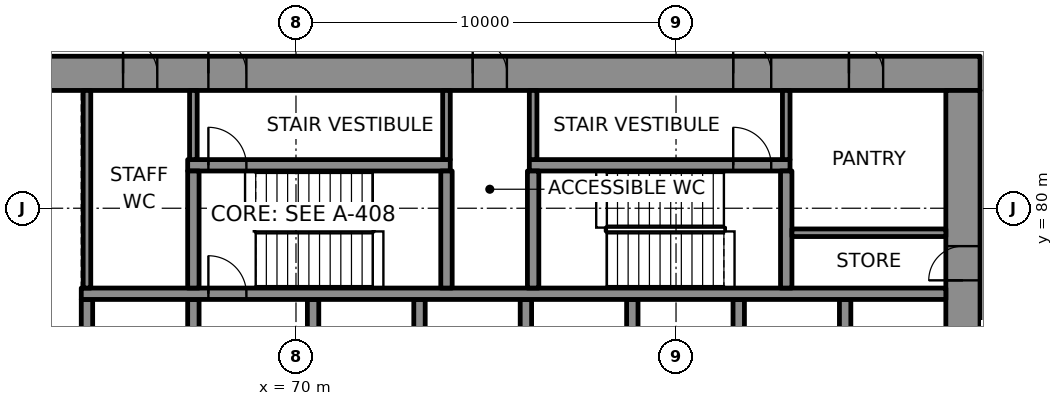
"""IFC4 building model, lengths in metres.
Left out: names, types, materials, properties, quantities, classifications, styles, units other than length and angle.
Written with IfcOpenShell. Run it as: python <this file> out.ifc"""

import sys

from ifc_helpers import new_model, si_unit, direction, frame, frame_2d, origin, place, context, subcontext, project, spatial, rectangle, extrude, element, fill, save


model = new_model("IFC4")
c1 = context("Model", 3, precision=1e-05, world=origin(), true_north=direction((0.0, 1.0)))
c2 = subcontext(c1, "Body", "Model", "MODEL_VIEW")
j1 = project(units=[si_unit("LENGTHUNIT", "METRE"), si_unit("PLANEANGLEUNIT", "RADIAN")], contexts=[c1])
p1 = place(None, origin())
s1 = spatial("IfcSite", under=j1, at=p1, CompositionType="ELEMENT")
p2 = place(p1, origin())
s2 = spatial("IfcBuilding", under=s1, at=p2, CompositionType="ELEMENT")
p3 = place(p2, frame((0.0, 0.0, 111.4)))
s3 = spatial("IfcBuildingStorey", under=s2, at=p3, CompositionType="ELEMENT", Elevation=111.4)
p4 = place(p3, frame((62.9, 83.55, 0.0), z_axis=(0.0, 0.0, 1.0), x_axis=(1.0, 0.0, 0.0)))
e1 = element("IfcWall", 1, at=p4, inside=s3, PredefinedType="SHEAR", context=c2, shape_type="SweptSolid", body=[
    extrude(rectangle(XDim=25.1, YDim=0.9, at=frame_2d((12.55, 0.0))), origin(), (0.0, 0.0, 1.0), 4.0),
])
p5 = place(p4, frame((4.795, 0.0, 0.0)))
e2 = element("IfcOpeningElement", 2, at=p5, cuts=e1, PredefinedType="OPENING", context=c2, shape_type="SweptSolid", body=[
    extrude(rectangle(XDim=1.0, YDim=2.1, at=frame_2d((0.5, 1.05))), frame((0.0, 0.46, 0.0), z_axis=(0.0, -1.0, 0.0), x_axis=(1.0, 0.0, 0.0)), (0.0, 0.0, 1.0), 0.92),
])
p6 = place(p4, frame((18.605, 0.0, 0.0)))
e3 = element("IfcOpeningElement", 3, at=p6, cuts=e1, PredefinedType="OPENING", context=c2, shape_type="SweptSolid", body=[
    extrude(rectangle(XDim=1.0, YDim=2.1, at=frame_2d((0.5, 1.05))), frame((0.0, 0.46, 0.0), z_axis=(0.0, -1.0, 0.0), x_axis=(1.0, 0.0, 0.0)), (0.0, 0.0, 1.0), 0.92),
])
p7 = place(p4, frame((2.55, 0.0, 0.0)))
e4 = element("IfcOpeningElement", 4, at=p7, cuts=e1, PredefinedType="OPENING", context=c2, shape_type="SweptSolid", body=[
    extrude(rectangle(XDim=0.9, YDim=2.1, at=frame_2d((0.45, 1.05))), frame((0.0, 0.46, 0.0), z_axis=(0.0, -1.0, 0.0), x_axis=(1.0, 0.0, 0.0)), (0.0, 0.0, 1.0), 0.92),
])
p8 = place(p4, frame((11.75, 0.0, 0.0)))
e5 = element("IfcOpeningElement", 5, at=p8, cuts=e1, PredefinedType="OPENING", context=c2, shape_type="SweptSolid", body=[
    extrude(rectangle(XDim=0.9, YDim=2.1, at=frame_2d((0.45, 1.05))), frame((0.0, 0.46, 0.0), z_axis=(0.0, -1.0, 0.0), x_axis=(1.0, 0.0, 0.0)), (0.0, 0.0, 1.0), 0.92),
])
p9 = place(p4, frame((21.65, 0.0, 0.0)))
e6 = element("IfcOpeningElement", 6, at=p9, cuts=e1, PredefinedType="OPENING", context=c2, shape_type="SweptSolid", body=[
    extrude(rectangle(XDim=0.9, YDim=2.1, at=frame_2d((0.45, 1.05))), frame((0.0, 0.46, 0.0), z_axis=(0.0, -1.0, 0.0), x_axis=(1.0, 0.0, 0.0)), (0.0, 0.0, 1.0), 0.92),
])
p10 = place(p3, frame((87.55, 66.9, 0.0), z_axis=(0.0, 0.0, 1.0), x_axis=(0.0, 1.0, 0.0)))
e7 = element("IfcWall", 7, at=p10, inside=s3, PredefinedType="SHEAR", context=c2, shape_type="SweptSolid", body=[
    extrude(rectangle(XDim=16.2, YDim=0.9, at=frame_2d((8.1, 0.0))), origin(), (0.0, 0.0, 1.0), 4.0),
])
p11 = place(p10, frame((5.5, 0.0, 0.0)))
e8 = element("IfcOpeningElement", 8, at=p11, cuts=e7, PredefinedType="OPENING", context=c2, shape_type="SweptSolid", body=[
    extrude(rectangle(XDim=1.8, YDim=2.1, at=frame_2d((0.9, 1.05))), frame((0.0, 0.46, 0.0), z_axis=(0.0, -1.0, 0.0), x_axis=(1.0, 0.0, 0.0)), (0.0, 0.0, 1.0), 0.92),
])
p12 = place(p10, frame((11.202, 0.0, 0.0)))
e9 = element("IfcOpeningElement", 9, at=p12, cuts=e7, PredefinedType="OPENING", context=c2, shape_type="SweptSolid", body=[
    extrude(rectangle(XDim=0.9, YDim=2.1, at=frame_2d((0.45, 1.05))), frame((0.0, 0.46, 0.0), z_axis=(0.0, -1.0, 0.0), x_axis=(1.0, 0.0, 0.0)), (0.0, 0.0, 1.0), 0.92),
])
for number, where, z_axis, x_axis in (
    (10, (64.5, 75.0, 0.0), (0.0, 0.0, 1.0), (0.0, 1.0, 0.0)),
    (11, (67.3, 75.0, 0.0), (0.0, 0.0, 1.0), (0.0, 1.0, 0.0)),
):
    element("IfcWall", number, at=place(p3, frame(where, z_axis=z_axis, x_axis=x_axis)), inside=s3, PredefinedType="SHEAR", context=c2, shape_type="SweptSolid", body=[
        extrude(rectangle(XDim=2.6, YDim=0.3, at=frame_2d((1.3, 0.0))), origin(), (0.0, 0.0, 1.0), 4.0),
    ])
p13 = place(p3, frame((70.45, 75.0, 0.0), z_axis=(0.0, 0.0, 1.0), x_axis=(0.0, 1.0, 0.0)))
e12 = element("IfcWall", 12, at=p13, inside=s3, PredefinedType="SHEAR", context=c2, shape_type="SweptSolid", body=[
    extrude(rectangle(XDim=2.6, YDim=0.3, at=frame_2d((1.3, 0.0))), origin(), (0.0, 0.0, 1.0), 4.0),
])
p14 = place(p13, frame((0.15, 0.0, 0.0)))
e13 = element("IfcOpeningElement", 13, at=p14, cuts=e12, PredefinedType="OPENING", context=c2, shape_type="SweptSolid", body=[
    extrude(rectangle(XDim=1.1, YDim=2.1, at=frame_2d((0.55, 1.05))), frame((0.0, 0.16, 0.0), z_axis=(0.0, -1.0, 0.0), x_axis=(1.0, 0.0, 0.0)), (0.0, 0.0, 1.0), 0.32),
])
for number, where, z_axis, x_axis in (
    (14, (73.25, 75.0, 0.0), (0.0, 0.0, 1.0), (0.0, 1.0, 0.0)),
    (15, (76.05, 75.0, 0.0), (0.0, 0.0, 1.0), (0.0, 1.0, 0.0)),
    (16, (78.85, 75.0, 0.0), (0.0, 0.0, 1.0), (0.0, 1.0, 0.0)),
    (17, (81.65, 75.0, 0.0), (0.0, 0.0, 1.0), (0.0, 1.0, 0.0)),
    (18, (84.45, 75.0, 0.0), (0.0, 0.0, 1.0), (0.0, 1.0, 0.0)),
):
    element("IfcWall", number, at=place(p3, frame(where, z_axis=z_axis, x_axis=x_axis)), inside=s3, PredefinedType="SHEAR", context=c2, shape_type="SweptSolid", body=[
        extrude(rectangle(XDim=2.6, YDim=0.3, at=frame_2d((1.3, 0.0))), origin(), (0.0, 0.0, 1.0), 4.0),
    ])
p15 = place(p3, frame((64.35, 77.75, 0.0), z_axis=(0.0, 0.0, 1.0), x_axis=(1.0, 0.0, 0.0)))
e19 = element("IfcWall", 19, at=p15, inside=s3, PredefinedType="SHEAR", context=c2, shape_type="SweptSolid", body=[
    extrude(rectangle(XDim=22.75, YDim=0.3, at=frame_2d((11.375, 0.0))), origin(), (0.0, 0.0, 1.0), 4.0),
])
p16 = place(p15, frame((3.345, 0.0, 0.0)))
e20 = element("IfcOpeningElement", 20, at=p16, cuts=e19, PredefinedType="OPENING", context=c2, shape_type="SweptSolid", body=[
    extrude(rectangle(XDim=1.0, YDim=2.1, at=frame_2d((0.5, 1.05))), frame((0.0, 0.16, 0.0), z_axis=(0.0, -1.0, 0.0), x_axis=(1.0, 0.0, 0.0)), (0.0, 0.0, 1.0), 0.32),
])
p17 = place(p3, frame((67.15, 81.13, 0.0), z_axis=(0.0, 0.0, 1.0), x_axis=(1.0, 0.0, 0.0)))
e21 = element("IfcWall", 21, at=p17, inside=s3, PredefinedType="SHEAR", context=c2, shape_type="SweptSolid", body=[
    extrude(rectangle(XDim=6.91, YDim=0.3, at=frame_2d((3.455, 0.0))), origin(), (0.0, 0.0, 1.0), 4.0),
])
p18 = place(p17, frame((0.545, 0.0, 0.0)))
e22 = element("IfcOpeningElement", 22, at=p18, cuts=e21, PredefinedType="OPENING", context=c2, shape_type="SweptSolid", body=[
    extrude(rectangle(XDim=1.0, YDim=2.1, at=frame_2d((0.5, 1.05))), frame((0.0, 0.16, 0.0), z_axis=(0.0, -1.0, 0.0), x_axis=(1.0, 0.0, 0.0)), (0.0, 0.0, 1.0), 0.32),
])
p19 = place(p3, frame((76.14, 81.13, 0.0), z_axis=(0.0, 0.0, 1.0), x_axis=(1.0, 0.0, 0.0)))
e23 = element("IfcWall", 23, at=p19, inside=s3, PredefinedType="SHEAR", context=c2, shape_type="SweptSolid", body=[
    extrude(rectangle(XDim=6.86, YDim=0.3, at=frame_2d((3.43, 0.0))), origin(), (0.0, 0.0, 1.0), 4.0),
])
p20 = place(p19, frame((5.365, 0.0, 0.0)))
e24 = element("IfcOpeningElement", 24, at=p20, cuts=e23, PredefinedType="OPENING", context=c2, shape_type="SweptSolid", body=[
    extrude(rectangle(XDim=1.0, YDim=2.1, at=frame_2d((0.5, 1.05))), frame((0.0, 0.16, 0.0), z_axis=(0.0, -1.0, 0.0), x_axis=(1.0, 0.0, 0.0)), (0.0, 0.0, 1.0), 0.32),
])
for number, where, z_axis, x_axis in (
    (25, (67.3, 77.9, 0.0), (0.0, 0.0, 1.0), (0.0, 1.0, 0.0)),
    (26, (73.96, 77.9, 0.0), (0.0, 0.0, 1.0), (0.0, 1.0, 0.0)),
    (27, (76.24, 77.9, 0.0), (0.0, 0.0, 1.0), (0.0, 1.0, 0.0)),
    (28, (82.9, 77.9, 0.0), (0.0, 0.0, 1.0), (0.0, 1.0, 0.0)),
):
    element("IfcWall", number, at=place(p3, frame(where, z_axis=z_axis, x_axis=x_axis)), inside=s3, PredefinedType="SHEAR", context=c2, shape_type="SweptSolid", body=[
        extrude(rectangle(XDim=3.08, YDim=0.3, at=frame_2d((1.54, 0.0))), origin(), (0.0, 0.0, 1.0), 4.0),
    ])
p21 = place(p3, frame((83.05, 79.355, 0.0), z_axis=(0.0, 0.0, 1.0), x_axis=(1.0, 0.0, 0.0)))
e29 = element("IfcWall", 29, at=p21, inside=s3, PredefinedType="PARTITIONING", context=c2, shape_type="SweptSolid", body=[
    extrude(rectangle(XDim=4.05, YDim=0.2, at=frame_2d((2.025, 0.0))), origin(), (0.0, 0.0, 1.0), 4.0),
])
p22 = place(p3, frame((64.5, 77.9, 0.0), z_axis=(0.0, 0.0, 1.0), x_axis=(0.0, 1.0, 0.0)))
e30 = element("IfcWall", 30, at=p22, inside=s3, PredefinedType="PARTITIONING", context=c2, shape_type="SweptSolid", body=[
    extrude(rectangle(XDim=5.2, YDim=0.2, at=frame_2d((2.6, 0.0))), origin(), (0.0, 0.0, 1.0), 4.0),
])
for number, where, z_axis, x_axis in (
    (31, (67.3, 81.28, 0.0), (0.0, 0.0, 1.0), (0.0, 1.0, 0.0)),
    (32, (73.96, 81.28, 0.0), (0.0, 0.0, 1.0), (0.0, 1.0, 0.0)),
    (33, (76.24, 81.28, 0.0), (0.0, 0.0, 1.0), (0.0, 1.0, 0.0)),
    (34, (82.9, 81.28, 0.0), (0.0, 0.0, 1.0), (0.0, 1.0, 0.0)),
):
    element("IfcWall", number, at=place(p3, frame(where, z_axis=z_axis, x_axis=x_axis)), inside=s3, PredefinedType="PARTITIONING", context=c2, shape_type="SweptSolid", body=[
        extrude(rectangle(XDim=1.82, YDim=0.2, at=frame_2d((0.91, 0.0))), origin(), (0.0, 0.0, 1.0), 4.0),
    ])
p23 = place(p16, origin())
e35 = element("IfcDoor", 35, at=p23, inside=s3, OperationType="SINGLE_SWING_LEFT", PredefinedType="DOOR", context=c2, shape_type="SweptSolid", body=[
    extrude(rectangle(XDim=1.0, YDim=2.1, at=frame_2d((0.5, 1.05))), frame((0.0, 0.025, 0.0), z_axis=(0.0, -1.0, 0.0), x_axis=(1.0, 0.0, 0.0)), (0.0, 0.0, 1.0), 0.05),
])
fill(e20, e35)
p24 = place(p18, origin())
e36 = element("IfcDoor", 36, at=p24, inside=s3, OperationType="SINGLE_SWING_RIGHT", PredefinedType="DOOR", context=c2, shape_type="SweptSolid", body=[
    extrude(rectangle(XDim=1.0, YDim=2.1, at=frame_2d((0.5, 1.05))), frame((0.0, 0.025, 0.0), z_axis=(0.0, -1.0, 0.0), x_axis=(1.0, 0.0, 0.0)), (0.0, 0.0, 1.0), 0.05),
])
fill(e22, e36)
p25 = place(p5, origin())
e37 = element("IfcDoor", 37, at=p25, inside=s3, OperationType="SINGLE_SWING_LEFT", PredefinedType="DOOR", context=c2, shape_type="SweptSolid", body=[
    extrude(rectangle(XDim=1.0, YDim=2.1, at=frame_2d((0.5, 1.05))), frame((0.0, 0.17, 0.0), z_axis=(0.0, -1.0, 0.0), x_axis=(1.0, 0.0, 0.0)), (0.0, 0.0, 1.0), 0.34),
])
fill(e2, e37)
p26 = place(p20, origin())
e38 = element("IfcDoor", 38, at=p26, inside=s3, OperationType="SINGLE_SWING_RIGHT", PredefinedType="DOOR", context=c2, shape_type="SweptSolid", body=[
    extrude(rectangle(XDim=1.0, YDim=2.1, at=frame_2d((0.5, 1.05))), frame((0.0, 0.025, 0.0), z_axis=(0.0, -1.0, 0.0), x_axis=(1.0, 0.0, 0.0)), (0.0, 0.0, 1.0), 0.05),
])
fill(e24, e38)
p27 = place(p6, origin())
e39 = element("IfcDoor", 39, at=p27, inside=s3, OperationType="SINGLE_SWING_LEFT", PredefinedType="DOOR", context=c2, shape_type="SweptSolid", body=[
    extrude(rectangle(XDim=1.0, YDim=2.1, at=frame_2d((0.5, 1.05))), frame((0.0, 0.17, 0.0), z_axis=(0.0, -1.0, 0.0), x_axis=(1.0, 0.0, 0.0)), (0.0, 0.0, 1.0), 0.34),
])
fill(e3, e39)
p28 = place(p7, origin())
e40 = element("IfcDoor", 40, at=p28, inside=s3, OperationType="SINGLE_SWING_RIGHT", PredefinedType="DOOR", context=c2, shape_type="SweptSolid", body=[
    extrude(rectangle(XDim=0.9, YDim=2.1, at=frame_2d((0.45, 1.05))), frame((0.0, 0.17, 0.0), z_axis=(0.0, -1.0, 0.0), x_axis=(1.0, 0.0, 0.0)), (0.0, 0.0, 1.0), 0.34),
])
fill(e4, e40)
p29 = place(p8, origin())
e41 = element("IfcDoor", 41, at=p29, inside=s3, OperationType="SINGLE_SWING_LEFT", PredefinedType="DOOR", context=c2, shape_type="SweptSolid", body=[
    extrude(rectangle(XDim=0.9, YDim=2.1, at=frame_2d((0.45, 1.05))), frame((0.0, 0.17, 0.0), z_axis=(0.0, -1.0, 0.0), x_axis=(1.0, 0.0, 0.0)), (0.0, 0.0, 1.0), 0.34),
])
fill(e5, e41)
p30 = place(p12, origin())
e42 = element("IfcDoor", 42, at=p30, inside=s3, OperationType="SINGLE_SWING_RIGHT", PredefinedType="DOOR", context=c2, shape_type="SweptSolid", body=[
    extrude(rectangle(XDim=0.9, YDim=2.1, at=frame_2d((0.45, 1.05))), frame((0.0, 0.17, 0.0), z_axis=(0.0, -1.0, 0.0), x_axis=(1.0, 0.0, 0.0)), (0.0, 0.0, 1.0), 0.34),
])
fill(e9, e42)
p31 = place(p9, origin())
e43 = element("IfcDoor", 43, at=p31, inside=s3, OperationType="SINGLE_SWING_LEFT", PredefinedType="DOOR", context=c2, shape_type="SweptSolid", body=[
    extrude(rectangle(XDim=0.9, YDim=2.1, at=frame_2d((0.45, 1.05))), frame((0.0, 0.17, 0.0), z_axis=(0.0, -1.0, 0.0), x_axis=(1.0, 0.0, 0.0)), (0.0, 0.0, 1.0), 0.34),
])
fill(e6, e43)
save(model, sys.argv[1])
